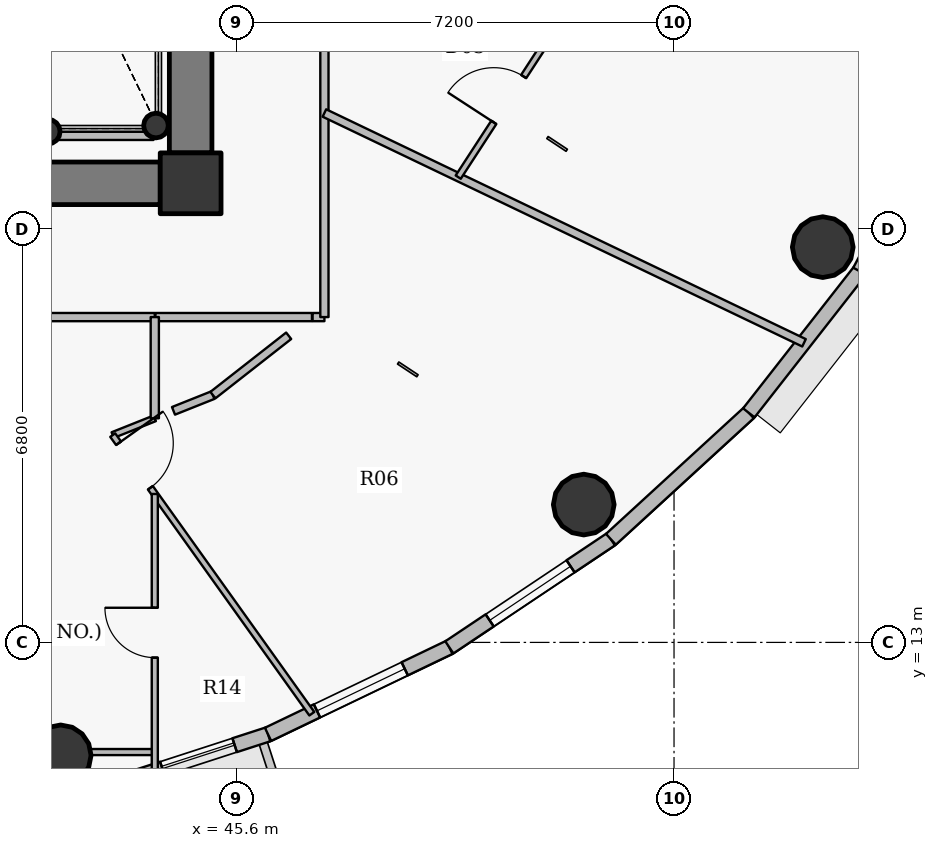
"""IFC4 building model, lengths in metres.
Left out: names, types, materials, properties, quantities, classifications, styles, units other than length and angle.
Written with IfcOpenShell. Run it as: python <this file> out.ifc"""

import sys

from ifc_helpers import new_model, si_unit, direction, frame, frame_2d, origin, origin_2d, place, context, subcontext, project, spatial, rectangle, hollow_circle, extrude, source, transform, mapped, element, fill, save


model = new_model("IFC4")
c1 = context("Model", 3, precision=1e-05, world=origin(), true_north=direction((0.0, 1.0)))
c2 = subcontext(c1, "Body", "Model", "MODEL_VIEW")
j1 = project(units=[si_unit("LENGTHUNIT", "METRE"), si_unit("PLANEANGLEUNIT", "RADIAN")], contexts=[c1])
p1 = place(None, origin())
s1 = spatial("IfcSite", under=j1, at=p1, CompositionType="ELEMENT")
p2 = place(p1, origin())
s2 = spatial("IfcBuilding", under=s1, at=p2, CompositionType="ELEMENT")
p3 = place(p2, frame((0.0, 0.0, 306.75)))
s3 = spatial("IfcBuildingStorey", under=s2, at=p3, CompositionType="ELEMENT", Elevation=306.75)
p4 = place(p3, frame((44.85, 20.55, 0.0), z_axis=(0.0, 0.0, 1.0), x_axis=(1.0, 0.0, 0.0)))
e1 = element("IfcColumn", 1, at=p4, inside=s3, PredefinedType="COLUMN", context=c2, shape_type="SweptSolid", body=[
    extrude(rectangle(XDim=1.0, YDim=1.0, at=origin_2d()), origin(), (0.0, 0.0, 1.0), 3.75),
])
for number, where, z_axis, x_axis in (
    (2, (44.28, 21.5, 0.0), (0.0, 0.0, 1.0), (1.0, 0.0, 0.0)),
    (3, (42.5, 21.4, 0.0), (0.0, 0.0, 1.0), (1.0, 0.0, 0.0)),
):
    element("IfcColumn", number, at=place(p3, frame(where, z_axis=z_axis, x_axis=x_axis)), inside=s3, PredefinedType="COLUMN", context=c2, shape_type="SweptSolid", body=[
        extrude(hollow_circle(Radius=0.203, WallThickness=0.016, at=origin_2d()), origin(), (0.0, 0.0, 1.0), 3.75),
    ])
p5 = place(p3, frame((44.85, 32.95, 0.0), z_axis=(0.0, 0.0, 1.0), x_axis=(0.0, -1.0, 0.0)))
e4 = element("IfcWall", 4, at=p5, inside=s3, PredefinedType="SHEAR", context=c2, shape_type="SweptSolid", body=[
    extrude(rectangle(XDim=11.9, YDim=0.7, at=frame_2d((5.95, 0.0))), origin(), (0.0, 0.0, 1.0), 3.05),
])
p6 = place(p3, frame((44.35, 20.55, 0.0), z_axis=(0.0, 0.0, 1.0), x_axis=(-1.0, 0.0, 0.0)))
e5 = element("IfcWall", 5, at=p6, inside=s3, PredefinedType="SHEAR", context=c2, shape_type="SweptSolid", body=[
    extrude(rectangle(XDim=16.7, YDim=0.7, at=frame_2d((8.35, 0.0))), origin(), (0.0, 0.0, 1.0), 3.05),
])
p7 = place(p6, frame((12.925, 0.0, 0.0)))
e6 = element("IfcOpeningElement", 6, at=p7, cuts=e5, PredefinedType="OPENING", context=c2, shape_type="SweptSolid", body=[
    extrude(rectangle(XDim=1.15, YDim=2.15, at=origin_2d()), frame((0.575, 0.36, 1.075), z_axis=(0.0, -1.0, 0.0), x_axis=(1.0, 0.0, 0.0)), (0.0, 0.0, 1.0), 0.72),
])
p8 = place(p6, frame((9.1, 0.0, 0.0)))
e7 = element("IfcOpeningElement", 7, at=p8, cuts=e5, PredefinedType="OPENING", context=c2, shape_type="SweptSolid", body=[
    extrude(rectangle(XDim=1.15, YDim=2.15, at=origin_2d()), frame((0.575, 0.36, 1.075), z_axis=(0.0, -1.0, 0.0), x_axis=(1.0, 0.0, 0.0)), (0.0, 0.0, 1.0), 0.72),
])
for number, where, z_axis, x_axis in (
    (8, (42.712, 11.142, 0.0), (0.0, 0.0, 1.0), (1.0, 0.0, 0.0)),
    (9, (51.315, 15.267, 0.0), (0.0, 0.0, 1.0), (1.0, 0.0, 0.0)),
    (10, (55.246, 19.5, 0.0), (0.0, 0.0, 1.0), (1.0, 0.0, 0.0)),
):
    element("IfcColumn", number, at=place(p3, frame(where, z_axis=z_axis, x_axis=x_axis)), inside=s3, PredefinedType="COLUMN", context=c2, shape_type="SweptSolid", body=[
        extrude(hollow_circle(Radius=0.5, WallThickness=0.032, at=origin_2d()), origin(), (0.0, 0.0, 1.0), 3.75),
    ])
p9 = place(p3, frame((46.123, 11.488, 0.0), z_axis=(0.0, 0.0, 1.0), x_axis=(-0.95123136723, -0.308478339592, 0.0)))
e11 = element("IfcWall", 11, at=p9, inside=s3, PredefinedType="SOLIDWALL", context=c2, shape_type="SweptSolid", body=[
    extrude(rectangle(XDim=3.398, YDim=0.24, at=frame_2d((1.699, 0.0))), origin(), (0.0, 0.0, 1.0), 3.5),
])
p10 = place(p9, frame((0.577, 0.0, 0.9)))
e12 = element("IfcOpeningElement", 12, at=p10, cuts=e11, PredefinedType="OPENING", context=c2, shape_type="SweptSolid", body=[
    extrude(rectangle(XDim=1.25, YDim=1.65, at=origin_2d()), frame((0.625, 0.13, 0.825), z_axis=(0.0, -1.0, 0.0), x_axis=(1.0, 0.0, 0.0)), (0.0, 0.0, 1.0), 0.26),
])
p11 = place(p3, frame((49.104, 12.918, 0.0), z_axis=(0.0, 0.0, 1.0), x_axis=(-0.901573741254, -0.43262546051, 0.0)))
e13 = element("IfcWall", 13, at=p11, inside=s3, PredefinedType="SOLIDWALL", context=c2, shape_type="SweptSolid", body=[
    extrude(rectangle(XDim=3.307, YDim=0.24, at=frame_2d((1.653, 0.0))), origin(), (0.0, 0.0, 1.0), 3.5),
])
p12 = place(p11, frame((0.814, 0.0, 0.9)))
e14 = element("IfcOpeningElement", 14, at=p12, cuts=e13, PredefinedType="OPENING", context=c2, shape_type="SweptSolid", body=[
    extrude(rectangle(XDim=1.6, YDim=1.75, at=origin_2d()), frame((0.8, 0.13, 0.875), z_axis=(0.0, -1.0, 0.0), x_axis=(1.0, 0.0, 0.0)), (0.0, 0.0, 1.0), 0.26),
])
p13 = place(p3, frame((51.762, 14.696, 0.0), z_axis=(0.0, 0.0, 1.0), x_axis=(-0.831250592635, -0.55589787933, 0.0)))
e15 = element("IfcWall", 15, at=p13, inside=s3, PredefinedType="SOLIDWALL", context=c2, shape_type="SweptSolid", body=[
    extrude(rectangle(XDim=3.197, YDim=0.24, at=frame_2d((1.599, 0.0))), origin(), (0.0, 0.0, 1.0), 3.5),
])
p14 = place(p13, frame((0.799, 0.0, 0.9)))
e16 = element("IfcOpeningElement", 16, at=p14, cuts=e15, PredefinedType="OPENING", context=c2, shape_type="SweptSolid", body=[
    extrude(rectangle(XDim=1.6, YDim=1.75, at=origin_2d()), frame((0.8, 0.13, 0.875), z_axis=(0.0, -1.0, 0.0), x_axis=(1.0, 0.0, 0.0)), (0.0, 0.0, 1.0), 0.26),
])
p15 = place(p3, frame((54.03, 16.775, 0.0), z_axis=(0.0, 0.0, 1.0), x_axis=(-0.737068506972, -0.675818034703, 0.0)))
e17 = element("IfcWall", 17, at=p15, inside=s3, PredefinedType="SOLIDWALL", context=c2, shape_type="SweptSolid", body=[
    extrude(rectangle(XDim=3.077, YDim=0.24, at=frame_2d((1.539, 0.0))), origin(), (0.0, 0.0, 1.0), 3.5),
])
p16 = place(p3, frame((55.854, 19.105, 0.0), z_axis=(0.0, 0.0, 1.0), x_axis=(-0.616337186556, -0.787482363275, 0.0)))
e18 = element("IfcWall", 18, at=p16, inside=s3, PredefinedType="SOLIDWALL", context=c2, shape_type="SweptSolid", body=[
    extrude(rectangle(XDim=2.958, YDim=0.24, at=frame_2d((1.479, 0.0))), origin(), (0.0, 0.0, 1.0), 3.5),
])
p17 = place(p3, frame((57.188, 21.628, 0.0), z_axis=(0.0, 0.0, 1.0), x_axis=(-0.467628269026, -0.883925224218, 0.0)))
e19 = element("IfcWall", 19, at=p17, inside=s3, PredefinedType="SOLIDWALL", context=c2, shape_type="SweptSolid", body=[
    extrude(rectangle(XDim=2.854, YDim=0.24, at=frame_2d((1.427, 0.0))), origin(), (0.0, 0.0, 1.0), 3.5),
])
p18 = place(p3, frame((24.95, 18.35, 0.0), z_axis=(0.0, 0.0, 1.0), x_axis=(1.0, 0.0, 0.0)))
e20 = element("IfcWall", 20, at=p18, inside=s3, PredefinedType="PARTITIONING", context=c2, shape_type="SweptSolid", body=[
    extrude(rectangle(XDim=19.311, YDim=0.135, at=frame_2d((9.655, 0.0))), origin(), (0.0, 0.0, 1.0), 3.035),
])
p19 = place(p18, frame((9.319, 0.0, 0.0)))
e21 = element("IfcOpeningElement", 21, at=p19, cuts=e20, PredefinedType="OPENING", context=c2, shape_type="SweptSolid", body=[
    extrude(rectangle(XDim=1.0, YDim=2.15, at=origin_2d()), frame((0.5, 0.078, 1.075), z_axis=(0.0, -1.0, 0.0), x_axis=(1.0, 0.0, 0.0)), (0.0, 0.0, 1.0), 0.155),
])
p20 = place(p3, frame((37.857, 11.197, 0.0), z_axis=(0.0, 0.0, 1.0), x_axis=(1.0, 0.0, 0.0)))
e22 = element("IfcWall", 22, at=p20, inside=s3, PredefinedType="PARTITIONING", context=c2, shape_type="SweptSolid", body=[
    extrude(rectangle(XDim=6.404, YDim=0.1, at=frame_2d((3.202, 0.0))), origin(), (0.0, 0.0, 1.0), 2.985),
])
p21 = place(p20, frame((1.962, 0.0, 0.0)))
e23 = element("IfcOpeningElement", 23, at=p21, cuts=e22, PredefinedType="OPENING", context=c2, shape_type="SweptSolid", body=[
    extrude(rectangle(XDim=0.9, YDim=2.1, at=origin_2d()), frame((0.45, 0.06, 1.05), z_axis=(0.0, -1.0, 0.0), x_axis=(1.0, 0.0, 0.0)), (0.0, 0.0, 1.0), 0.12),
])
p22 = place(p3, frame((43.568, 16.409, 0.0), z_axis=(0.0, 0.0, 1.0), x_axis=(0.928815226083, 0.370543217178, 0.0)))
e24 = element("IfcWall", 24, at=p22, inside=s3, PredefinedType="PARTITIONING", context=c2, shape_type="SweptSolid", body=[
    extrude(rectangle(XDim=0.745, YDim=0.1, at=frame_2d((0.373, 0.0))), origin(), (0.0, 0.0, 1.0), 3.5),
])
p23 = place(p3, frame((43.568, 16.409, 0.0), z_axis=(0.0, 0.0, 1.0), x_axis=(0.581447306737, -0.81358406418, 0.0)))
e25 = element("IfcWall", 25, at=p23, inside=s3, PredefinedType="PARTITIONING", context=c2, shape_type="SweptSolid", body=[
    extrude(rectangle(XDim=5.632, YDim=0.1, at=frame_2d((2.816, 0.0))), origin(), (0.0, 0.0, 1.0), 2.985),
])
p24 = place(p23, frame((0.165, 0.0, 0.0)))
e26 = element("IfcOpeningElement", 26, at=p24, cuts=e25, PredefinedType="OPENING", context=c2, shape_type="SweptSolid", body=[
    extrude(rectangle(XDim=0.9, YDim=2.1, at=origin_2d()), frame((0.45, 0.06, 1.05), z_axis=(0.0, -1.0, 0.0), x_axis=(1.0, 0.0, 0.0)), (0.0, 0.0, 1.0), 0.12),
])
p25 = place(p3, frame((44.26, 10.878, 0.0), z_axis=(0.0, 0.0, 1.0), x_axis=(0.0, 1.0, 0.0)))
e27 = element("IfcWall", 27, at=p25, inside=s3, PredefinedType="PARTITIONING", context=c2, shape_type="SweptSolid", body=[
    extrude(rectangle(XDim=4.563, YDim=0.1, at=frame_2d((2.281, 0.0))), origin(), (0.0, 0.0, 1.0), 2.985),
])
p26 = place(p25, frame((1.871, 0.0, 0.0)))
e28 = element("IfcOpeningElement", 28, at=p26, cuts=e27, PredefinedType="OPENING", context=c2, shape_type="SweptSolid", body=[
    extrude(rectangle(XDim=0.82, YDim=2.1, at=origin_2d()), frame((0.41, 0.06, 1.05), z_axis=(0.0, -1.0, 0.0), x_axis=(1.0, 0.0, 0.0)), (0.0, 0.0, 1.0), 0.12),
])
p27 = place(p3, frame((46.855, 18.35, 0.0), z_axis=(0.0, 0.0, 1.0), x_axis=(1.0, 0.0, 0.0)))
e29 = element("IfcWall", 29, at=p27, inside=s3, PredefinedType="PARTITIONING", context=c2, shape_type="SweptSolid", body=[
    extrude(rectangle(XDim=0.195, YDim=0.135, at=frame_2d((0.097, 0.0))), origin(), (0.0, 0.0, 1.0), 3.035),
])
p28 = place(p3, frame((47.05, 18.35, 0.0), z_axis=(0.0, 0.0, 1.0), x_axis=(0.0, 1.0, 0.0)))
e30 = element("IfcWall", 30, at=p28, inside=s3, PredefinedType="PARTITIONING", context=c2, shape_type="SweptSolid", body=[
    extrude(rectangle(XDim=17.3, YDim=0.135, at=frame_2d((8.65, 0.0))), origin(), (0.0, 0.0, 1.0), 3.035),
])
p29 = place(p28, frame((9.808, 0.0, 0.0)))
e31 = element("IfcOpeningElement", 31, at=p29, cuts=e30, PredefinedType="OPENING", context=c2, shape_type="SweptSolid", body=[
    extrude(rectangle(XDim=1.0, YDim=2.15, at=origin_2d()), frame((0.5, 0.078, 1.075), z_axis=(0.0, -1.0, 0.0), x_axis=(1.0, 0.0, 0.0)), (0.0, 0.0, 1.0), 0.155),
])
p30 = place(p3, frame((47.05, 21.706, 0.0), z_axis=(0.0, 0.0, 1.0), x_axis=(0.901842087785, -0.432065792096, 0.0)))
e32 = element("IfcWall", 32, at=p30, inside=s3, PredefinedType="PARTITIONING", context=c2, shape_type="SweptSolid", body=[
    extrude(rectangle(XDim=8.747, YDim=0.135, at=frame_2d((4.373, 0.0))), origin(), (0.0, 0.0, 1.0), 2.985),
])
p31 = place(p3, frame((49.25, 20.652, 0.0), z_axis=(0.0, 0.0, 1.0), x_axis=(0.54545856642, 0.838137788385, 0.0)))
e33 = element("IfcWall", 33, at=p31, inside=s3, PredefinedType="PARTITIONING", context=c2, shape_type="SweptSolid", body=[
    extrude(rectangle(XDim=3.047, YDim=0.1, at=frame_2d((1.523, 0.0))), origin(), (0.0, 0.0, 1.0), 3.035),
])
p32 = place(p31, frame((1.073, 0.0, 0.0)))
e34 = element("IfcOpeningElement", 34, at=p32, cuts=e33, PredefinedType="OPENING", context=c2, shape_type="SweptSolid", body=[
    extrude(rectangle(XDim=0.9, YDim=2.1, at=origin_2d()), frame((0.45, 0.06, 1.05), z_axis=(0.0, -1.0, 0.0), x_axis=(1.0, 0.0, 0.0)), (0.0, 0.0, 1.0), 0.12),
])
p33 = place(p3, frame((44.24, 21.33, 0.0), z_axis=(0.0, 0.0, 1.0), x_axis=(-1.0, 0.0, 0.0)))
e35 = element("IfcWall", 35, at=p33, inside=s3, PredefinedType="PARTITIONING", context=c2, shape_type="SweptSolid", body=[
    extrude(rectangle(XDim=2.98, YDim=0.135, at=frame_2d((1.49, 0.0))), origin(), (0.0, 0.0, 1.0), 3.035),
])
p34 = place(p3, frame((46.845, 18.35, 0.0), z_axis=(0.0, 0.0, 1.0), x_axis=(-1.0, 0.0, 0.0)))
e36 = element("IfcWall", 36, at=p34, inside=s3, PredefinedType="PARTITIONING", context=c2, shape_type="SweptSolid", body=[
    extrude(rectangle(XDim=2.575, YDim=0.135, at=frame_2d((1.287, 0.0))), origin(), (0.0, 0.0, 1.0), 3.5),
])
p35 = place(p3, frame((44.36, 20.2, 0.0), z_axis=(0.0, 0.0, 1.0), x_axis=(1.0, 0.0, 0.0)))
e37 = element("IfcWall", 37, at=p35, inside=s3, PredefinedType="PARTITIONING", context=c2, shape_type="SweptSolid", body=[
    extrude(rectangle(XDim=0.84, YDim=0.135, at=frame_2d((0.42, 0.0))), origin(), (0.0, 0.0, 1.0), 3.035),
])
p36 = place(p3, frame((45.2, 20.508, 0.0), z_axis=(0.0, 0.0, 1.0), x_axis=(0.0, 1.0, 0.0)))
e38 = element("IfcWall", 38, at=p36, inside=s3, PredefinedType="PARTITIONING", context=c2, shape_type="SweptSolid", body=[
    extrude(rectangle(XDim=0.532, YDim=0.135, at=frame_2d((0.266, 0.0))), origin(), (0.0, 0.0, 1.0), 3.5),
])
p37 = place(p3, frame((44.26, 18.35, 0.0), z_axis=(0.0, 0.0, 1.0), x_axis=(0.0, -1.0, 0.0)))
e39 = element("IfcWall", 39, at=p37, inside=s3, PredefinedType="PARTITIONING", context=c2, shape_type="SweptSolid", body=[
    extrude(rectangle(XDim=1.665, YDim=0.135, at=frame_2d((0.832, 0.0))), origin(), (0.0, 0.0, 1.0), 3.5),
])
p38 = place(p3, frame((44.568, 16.808, 0.0), z_axis=(0.0, 0.0, 1.0), x_axis=(0.928813825631, 0.370546727576, 0.0)))
e40 = element("IfcWall", 40, at=p38, inside=s3, PredefinedType="PARTITIONING", context=c2, shape_type="SweptSolid", body=[
    extrude(rectangle(XDim=0.698, YDim=0.135, at=frame_2d((0.349, 0.0))), origin(), (0.0, 0.0, 1.0), 3.5),
])
p39 = place(p3, frame((45.217, 17.067, 0.0), z_axis=(0.0, 0.0, 1.0), x_axis=(0.787329157173, 0.616532884982, 0.0)))
e41 = element("IfcWall", 41, at=p39, inside=s3, PredefinedType="PARTITIONING", context=c2, shape_type="SweptSolid", body=[
    extrude(rectangle(XDim=1.582, YDim=0.135, at=frame_2d((0.791, 0.0))), origin(), (0.0, 0.0, 1.0), 3.5),
])
m1 = source(origin(), c2, "Body", "SweptSolid", [
    extrude(rectangle(XDim=1.6, YDim=1.75, at=origin_2d()), frame((0.8, 0.03, 0.875), z_axis=(0.0, -1.0, 0.0), x_axis=(1.0, 0.0, 0.0)), (0.0, 0.0, 1.0), 0.06),
])
p40 = place(p12, origin())
e42 = element("IfcWindow", 42, at=p40, inside=s3, PartitioningType="DOUBLE_PANEL_VERTICAL", PredefinedType="WINDOW", context=c2, shape_type="MappedRepresentation", body=[
    mapped(m1, transform((0.0, 0.0, 0.0), x_axis=(1.0, 0.0, 0.0), y_axis=(0.0, 1.0, 0.0), z_axis=(0.0, 0.0, 1.0), scale=1.0)),
])
fill(e14, e42)
p41 = place(p14, origin())
e43 = element("IfcWindow", 43, at=p41, inside=s3, PartitioningType="DOUBLE_PANEL_VERTICAL", PredefinedType="WINDOW", context=c2, shape_type="MappedRepresentation", body=[
    mapped(m1, transform((0.0, 0.0, 0.0), x_axis=(1.0, 0.0, 0.0), y_axis=(0.0, 1.0, 0.0), z_axis=(0.0, 0.0, 1.0), scale=1.0)),
])
fill(e16, e43)
m2 = source(origin(), c2, "Body", "SweptSolid", [
    extrude(rectangle(XDim=1.25, YDim=1.65, at=origin_2d()), frame((0.625, 0.03, 0.825), z_axis=(0.0, -1.0, 0.0), x_axis=(1.0, 0.0, 0.0)), (0.0, 0.0, 1.0), 0.06),
])
p42 = place(p10, origin())
e44 = element("IfcWindow", 44, at=p42, inside=s3, PartitioningType="SINGLE_PANEL", PredefinedType="WINDOW", context=c2, shape_type="MappedRepresentation", body=[
    mapped(m2, transform((0.0, 0.0, 0.0), x_axis=(1.0, 0.0, 0.0), y_axis=(0.0, 1.0, 0.0), z_axis=(0.0, 0.0, 1.0), scale=1.0)),
])
fill(e12, e44)
m3 = source(origin(), c2, "Body", "SweptSolid", [
    extrude(rectangle(XDim=0.9, YDim=2.1, at=origin_2d()), frame((0.45, 0.025, 1.05), z_axis=(0.0, -1.0, 0.0), x_axis=(1.0, 0.0, 0.0)), (0.0, 0.0, 1.0), 0.05),
])
p43 = place(p24, origin())
e45 = element("IfcDoor", 45, at=p43, inside=s3, OperationType="SINGLE_SWING_LEFT", PredefinedType="DOOR", context=c2, shape_type="MappedRepresentation", body=[
    mapped(m3, transform((0.0, 0.0, 0.0), x_axis=(1.0, 0.0, 0.0), y_axis=(0.0, 1.0, 0.0), z_axis=(0.0, 0.0, 1.0), scale=1.0)),
])
fill(e26, e45)
m4 = source(origin(), c2, "Body", "SweptSolid", [
    extrude(rectangle(XDim=0.82, YDim=2.1, at=origin_2d()), frame((0.41, 0.025, 1.05), z_axis=(0.0, -1.0, 0.0), x_axis=(1.0, 0.0, 0.0)), (0.0, 0.0, 1.0), 0.05),
])
p44 = place(p26, origin())
e46 = element("IfcDoor", 46, at=p44, inside=s3, OperationType="SINGLE_SWING_RIGHT", PredefinedType="DOOR", context=c2, shape_type="MappedRepresentation", body=[
    mapped(m4, transform((0.0, 0.0, 0.0), x_axis=(1.0, 0.0, 0.0), y_axis=(0.0, 1.0, 0.0), z_axis=(0.0, 0.0, 1.0), scale=1.0)),
])
fill(e28, e46)
p45 = place(p32, origin())
e47 = element("IfcDoor", 47, at=p45, inside=s3, OperationType="SINGLE_SWING_LEFT", PredefinedType="DOOR", context=c2, shape_type="MappedRepresentation", body=[
    mapped(m3, transform((0.0, 0.0, 0.0), x_axis=(1.0, 0.0, 0.0), y_axis=(0.0, 1.0, 0.0), z_axis=(0.0, 0.0, 1.0), scale=1.0)),
])
fill(e34, e47)
save(model, sys.argv[1])
